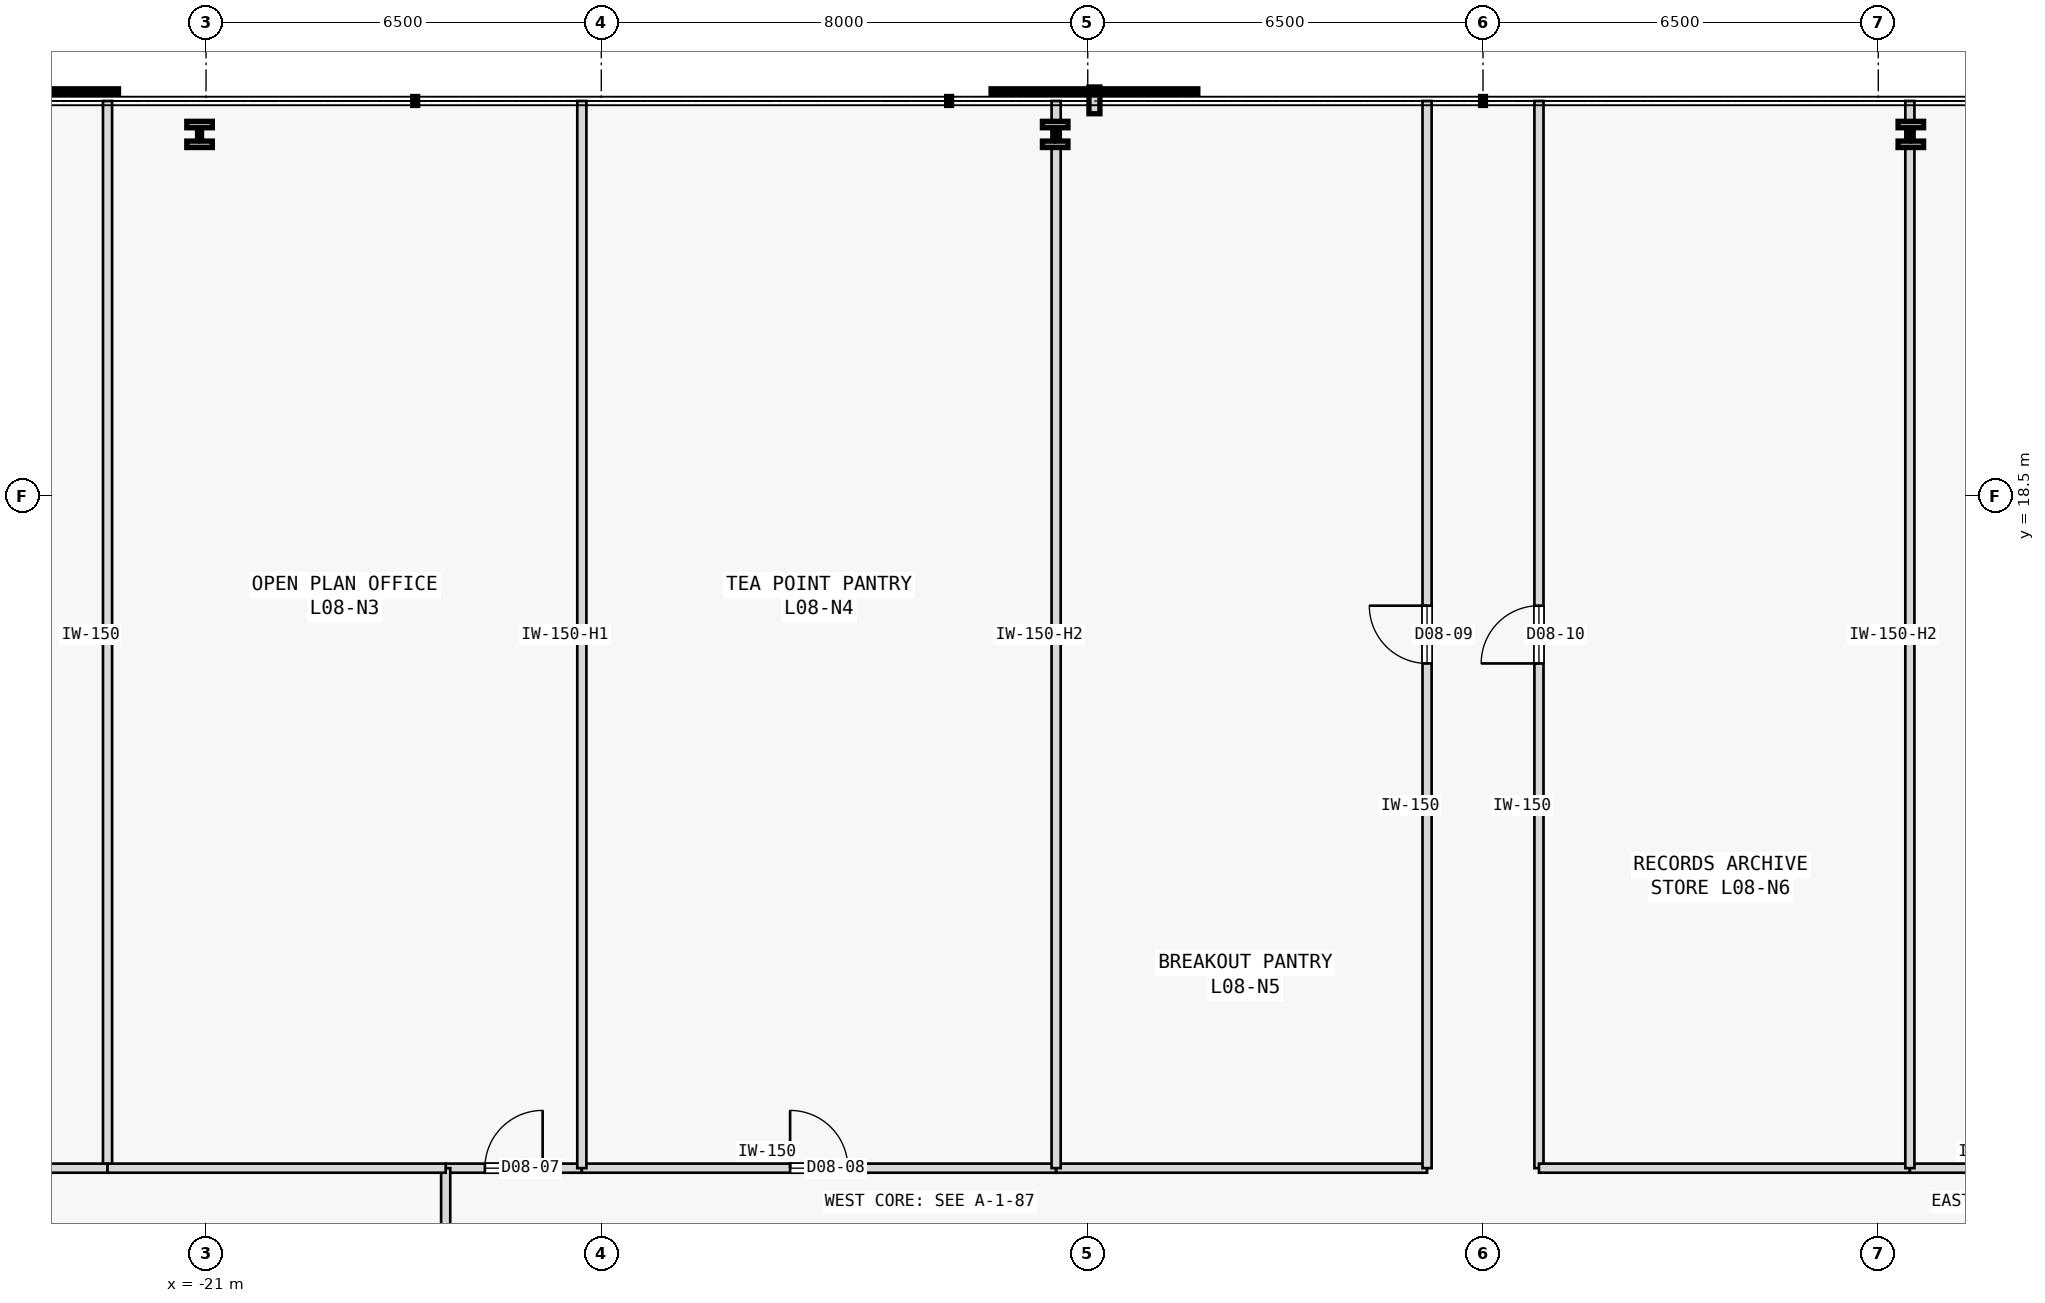
"""IFC4 building model, lengths in metres.
Left out: names, types, materials, properties, quantities, classifications, styles, units other than length and angle.
Written with IfcOpenShell. Run it as: python <this file> out.ifc"""

import sys

from ifc_helpers import new_model, si_unit, direction, frame, frame_2d, origin, origin_2d, place, context, subcontext, project, spatial, rectangle, i_section, extrude, element, fill, save


model = new_model("IFC4")
c1 = context("Model", 3, precision=1e-05, world=origin(), true_north=direction((0.0, 1.0)))
c2 = subcontext(c1, "Body", "Model", "MODEL_VIEW")
j1 = project(units=[si_unit("LENGTHUNIT", "METRE"), si_unit("PLANEANGLEUNIT", "RADIAN")], contexts=[c1])
p1 = place(None, origin())
s1 = spatial("IfcSite", under=j1, at=p1, CompositionType="ELEMENT")
p2 = place(p1, origin())
s2 = spatial("IfcBuilding", under=s1, at=p2, CompositionType="ELEMENT")
p3 = place(p2, frame((0.0, 0.0, 37.0)))
s3 = spatial("IfcBuildingStorey", under=s2, at=p3, CompositionType="ELEMENT", Elevation=37.0)
for number, where, z_axis, x_axis in (
    (1, (7.036, 24.45, 0.0), (0.0, 0.0, 1.0), (1.0, 0.0, 0.0)),
    (2, (-7.036, 24.45, 0.0), (0.0, 0.0, 1.0), (1.0, 0.0, 0.0)),
    (3, (-21.107, 24.45, 0.0), (0.0, 0.0, 1.0), (1.0, 0.0, 0.0)),
):
    element("IfcColumn", number, at=place(p3, frame(where, z_axis=z_axis, x_axis=x_axis)), inside=s3, PredefinedType="COLUMN", context=c2, shape_type="SweptSolid", body=[
        extrude(i_section(OverallWidth=0.42, OverallDepth=0.431, WebThickness=0.065, FlangeThickness=0.106, FilletRadius=0.015, at=origin_2d()), origin(), (0.0, 0.0, 1.0), 3.8),
    ])
p4 = place(p3, frame((-17.059, 7.45, 0.0), z_axis=(0.0, 0.0, 1.0), x_axis=(1.0, 0.0, 0.0)))
e4 = element("IfcWall", 4, at=p4, inside=s3, PredefinedType="PARTITIONING", context=c2, shape_type="SweptSolid", body=[
    extrude(rectangle(XDim=2.239, YDim=0.15, at=frame_2d((1.12, 0.0))), origin(), (0.0, 0.0, 1.0), 3.575),
])
p5 = place(p4, frame((0.645, 0.0, 0.0)))
e5 = element("IfcOpeningElement", 5, at=p5, cuts=e4, PredefinedType="OPENING", context=c2, shape_type="SweptSolid", body=[
    extrude(rectangle(XDim=0.95, YDim=2.15, at=frame_2d((0.475, 1.075))), frame((0.0, 0.085, 0.0), z_axis=(0.0, -1.0, 0.0), x_axis=(1.0, 0.0, 0.0)), (0.0, 0.0, 1.0), 0.17),
])
p6 = place(p3, frame((-14.82, 7.45, 0.0), z_axis=(0.0, 0.0, 1.0), x_axis=(1.0, 0.0, 0.0)))
e6 = element("IfcWall", 6, at=p6, inside=s3, PredefinedType="PARTITIONING", context=c2, shape_type="SweptSolid", body=[
    extrude(rectangle(XDim=7.8, YDim=0.15, at=frame_2d((3.9, 0.0))), origin(), (0.0, 0.0, 1.0), 3.575),
])
p7 = place(p6, frame((3.425, 0.0, 0.0)))
e7 = element("IfcOpeningElement", 7, at=p7, cuts=e6, PredefinedType="OPENING", context=c2, shape_type="SweptSolid", body=[
    extrude(rectangle(XDim=0.95, YDim=2.15, at=frame_2d((0.475, 1.075))), frame((0.0, 0.085, 0.0), z_axis=(0.0, -1.0, 0.0), x_axis=(1.0, 0.0, 0.0)), (0.0, 0.0, 1.0), 0.17),
])
p8 = place(p3, frame((-7.02, 7.45, 0.0), z_axis=(0.0, 0.0, 1.0), x_axis=(1.0, 0.0, 0.0)))
e8 = element("IfcWall", 8, at=p8, inside=s3, PredefinedType="PARTITIONING", context=c2, shape_type="SweptSolid", body=[
    extrude(rectangle(XDim=6.1, YDim=0.15, at=frame_2d((3.05, 0.0))), origin(), (0.0, 0.0, 1.0), 3.575),
])
p9 = place(p3, frame((-0.92, 7.45, 0.0), z_axis=(0.0, 0.0, 1.0), x_axis=(0.0, 1.0, 0.0)))
e9 = element("IfcWall", 9, at=p9, inside=s3, PredefinedType="PARTITIONING", context=c2, shape_type="SweptSolid", body=[
    extrude(rectangle(XDim=17.55, YDim=0.15, at=frame_2d((8.775, 0.0))), origin(), (0.0, 0.0, 1.0), 3.575),
])
p10 = place(p9, frame((8.3, 0.0, 0.0)))
e10 = element("IfcOpeningElement", 10, at=p10, cuts=e9, PredefinedType="OPENING", context=c2, shape_type="SweptSolid", body=[
    extrude(rectangle(XDim=0.95, YDim=2.15, at=frame_2d((0.475, 1.075))), frame((0.0, 0.085, 0.0), z_axis=(0.0, -1.0, 0.0), x_axis=(1.0, 0.0, 0.0)), (0.0, 0.0, 1.0), 0.17),
])
p11 = place(p3, frame((0.92, 7.45, 0.0), z_axis=(0.0, 0.0, 1.0), x_axis=(0.0, 1.0, 0.0)))
e11 = element("IfcWall", 11, at=p11, inside=s3, PredefinedType="PARTITIONING", context=c2, shape_type="SweptSolid", body=[
    extrude(rectangle(XDim=17.55, YDim=0.15, at=frame_2d((8.775, 0.0))), origin(), (0.0, 0.0, 1.0), 3.575),
])
p12 = place(p11, frame((8.3, 0.0, 0.0)))
e12 = element("IfcOpeningElement", 12, at=p12, cuts=e11, PredefinedType="OPENING", context=c2, shape_type="SweptSolid", body=[
    extrude(rectangle(XDim=0.95, YDim=2.15, at=frame_2d((0.475, 1.075))), frame((0.0, 0.085, 0.0), z_axis=(0.0, -1.0, 0.0), x_axis=(1.0, 0.0, 0.0)), (0.0, 0.0, 1.0), 0.17),
])
p13 = place(p3, frame((0.92, 7.45, 0.0), z_axis=(0.0, 0.0, 1.0), x_axis=(1.0, 0.0, 0.0)))
e13 = element("IfcWall", 13, at=p13, inside=s3, PredefinedType="PARTITIONING", context=c2, shape_type="SweptSolid", body=[
    extrude(rectangle(XDim=6.1, YDim=0.15, at=frame_2d((3.05, 0.0))), origin(), (0.0, 0.0, 1.0), 3.575),
])
p14 = place(p3, frame((7.02, 7.45, 0.0), z_axis=(0.0, 0.0, 1.0), x_axis=(1.0, 0.0, 0.0)))
e14 = element("IfcWall", 14, at=p14, inside=s3, PredefinedType="PARTITIONING", context=c2, shape_type="SweptSolid", body=[
    extrude(rectangle(XDim=7.8, YDim=0.15, at=frame_2d((3.9, 0.0))), origin(), (0.0, 0.0, 1.0), 3.575),
])
p15 = place(p14, frame((3.425, 0.0, 0.0)))
e15 = element("IfcOpeningElement", 15, at=p15, cuts=e14, PredefinedType="OPENING", context=c2, shape_type="SweptSolid", body=[
    extrude(rectangle(XDim=0.95, YDim=2.15, at=frame_2d((0.475, 1.075))), frame((0.0, 0.085, 0.0), z_axis=(0.0, -1.0, 0.0), x_axis=(1.0, 0.0, 0.0)), (0.0, 0.0, 1.0), 0.17),
])
p16 = place(p3, frame((-17.059, 0.92, 0.0), z_axis=(0.0, 0.0, 1.0), x_axis=(0.0, 1.0, 0.0)))
e16 = element("IfcWall", 16, at=p16, inside=s3, PredefinedType="PARTITIONING", context=c2, shape_type="SweptSolid", body=[
    extrude(rectangle(XDim=6.53, YDim=0.15, at=frame_2d((3.265, 0.0))), origin(), (0.0, 0.0, 1.0), 3.575),
])
p17 = place(p3, frame((-22.62, 7.45, 0.0), z_axis=(0.0, 0.0, 1.0), x_axis=(0.0, 1.0, 0.0)))
e17 = element("IfcWall", 17, at=p17, inside=s3, PredefinedType="PARTITIONING", context=c2, shape_type="SweptSolid", body=[
    extrude(rectangle(XDim=17.55, YDim=0.15, at=frame_2d((8.775, 0.0))), origin(), (0.0, 0.0, 1.0), 3.575),
])
p18 = place(p3, frame((-30.42, 7.45, 0.0), z_axis=(0.0, 0.0, 1.0), x_axis=(1.0, 0.0, 0.0)))
e18 = element("IfcWall", 18, at=p18, inside=s3, PredefinedType="PARTITIONING", context=c2, shape_type="SweptSolid", body=[
    extrude(rectangle(XDim=7.8, YDim=0.15, at=frame_2d((3.9, 0.0))), origin(), (0.0, 0.0, 1.0), 3.125),
])
p19 = place(p3, frame((-14.82, 7.45, 0.0), z_axis=(0.0, 0.0, 1.0), x_axis=(0.0, 1.0, 0.0)))
e19 = element("IfcWall", 19, at=p19, inside=s3, PredefinedType="PARTITIONING", context=c2, shape_type="SweptSolid", body=[
    extrude(rectangle(XDim=17.55, YDim=0.15, at=frame_2d((8.775, 0.0))), origin(), (0.0, 0.0, 1.0), 3.125),
])
p20 = place(p3, frame((-22.62, 7.45, 0.0), z_axis=(0.0, 0.0, 1.0), x_axis=(1.0, 0.0, 0.0)))
e20 = element("IfcWall", 20, at=p20, inside=s3, PredefinedType="PARTITIONING", context=c2, shape_type="SweptSolid", body=[
    extrude(rectangle(XDim=5.561, YDim=0.15, at=frame_2d((2.781, 0.0))), origin(), (0.0, 0.0, 1.0), 3.575),
])
for number, where, z_axis, x_axis in (
    (21, (-7.02, 7.45, 0.0), (0.0, 0.0, 1.0), (0.0, 1.0, 0.0)),
    (22, (7.02, 7.45, 0.0), (0.0, 0.0, 1.0), (0.0, 1.0, 0.0)),
):
    element("IfcWall", number, at=place(p3, frame(where, z_axis=z_axis, x_axis=x_axis)), inside=s3, PredefinedType="PARTITIONING", context=c2, shape_type="SweptSolid", body=[
        extrude(rectangle(XDim=17.55, YDim=0.15, at=frame_2d((8.775, 0.0))), origin(), (0.0, 0.0, 1.0), 2.975),
    ])
p21 = place(p5, origin())
e23 = element("IfcDoor", 23, at=p21, inside=s3, OperationType="SINGLE_SWING_RIGHT", PredefinedType="DOOR", context=c2, shape_type="SweptSolid", body=[
    extrude(rectangle(XDim=0.95, YDim=2.15, at=frame_2d((0.475, 1.075))), frame((0.0, 0.025, 0.0), z_axis=(0.0, -1.0, 0.0), x_axis=(1.0, 0.0, 0.0)), (0.0, 0.0, 1.0), 0.05),
])
fill(e5, e23)
p22 = place(p7, origin())
e24 = element("IfcDoor", 24, at=p22, inside=s3, OperationType="SINGLE_SWING_LEFT", PredefinedType="DOOR", context=c2, shape_type="SweptSolid", body=[
    extrude(rectangle(XDim=0.95, YDim=2.15, at=frame_2d((0.475, 1.075))), frame((0.0, 0.025, 0.0), z_axis=(0.0, -1.0, 0.0), x_axis=(1.0, 0.0, 0.0)), (0.0, 0.0, 1.0), 0.05),
])
fill(e7, e24)
p23 = place(p10, origin())
e25 = element("IfcDoor", 25, at=p23, inside=s3, OperationType="SINGLE_SWING_RIGHT", PredefinedType="DOOR", context=c2, shape_type="SweptSolid", body=[
    extrude(rectangle(XDim=0.95, YDim=2.15, at=frame_2d((0.475, 1.075))), frame((0.0, 0.025, 0.0), z_axis=(0.0, -1.0, 0.0), x_axis=(1.0, 0.0, 0.0)), (0.0, 0.0, 1.0), 0.05),
])
fill(e10, e25)
p24 = place(p12, origin())
e26 = element("IfcDoor", 26, at=p24, inside=s3, OperationType="SINGLE_SWING_LEFT", PredefinedType="DOOR", context=c2, shape_type="SweptSolid", body=[
    extrude(rectangle(XDim=0.95, YDim=2.15, at=frame_2d((0.475, 1.075))), frame((0.0, 0.025, 0.0), z_axis=(0.0, -1.0, 0.0), x_axis=(1.0, 0.0, 0.0)), (0.0, 0.0, 1.0), 0.05),
])
fill(e12, e26)
save(model, sys.argv[1])
